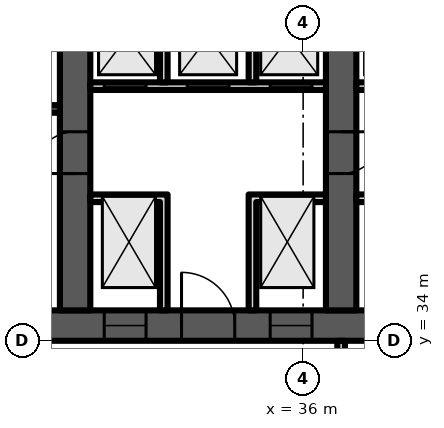
"""IFC4 building model, lengths in metres.
Left out: names, types, materials, properties, quantities, classifications, styles, units other than length and angle.
Written with IfcOpenShell. Run it as: python <this file> out.ifc"""

import sys

from ifc_helpers import new_model, si_unit, direction, frame, frame_2d, origin, place, context, subcontext, project, spatial, polyline, rectangle, outline, extrude, element, fill, save


model = new_model("IFC4")
c1 = context("Model", 3, precision=1e-05, world=origin(), true_north=direction((0.0, 1.0)))
c2 = subcontext(c1, "Body", "Model", "MODEL_VIEW")
j1 = project(units=[si_unit("LENGTHUNIT", "METRE"), si_unit("PLANEANGLEUNIT", "RADIAN")], contexts=[c1])
p1 = place(None, origin())
s1 = spatial("IfcSite", under=j1, at=p1, CompositionType="ELEMENT")
p2 = place(p1, origin())
s2 = spatial("IfcBuilding", under=s1, at=p2, CompositionType="ELEMENT")
p3 = place(p2, frame((0.0, 0.0, 151.9)))
s3 = spatial("IfcBuildingStorey", under=s2, at=p3, CompositionType="ELEMENT", Elevation=151.9)
p4 = place(p3, frame((16.0, 34.4, 0.0), z_axis=(0.0, 0.0, 1.0), x_axis=(1.0, 0.0, 0.0)))
e1 = element("IfcWall", 1, at=p4, inside=s3, PredefinedType="SHEAR", context=c2, shape_type="SweptSolid", body=[
    extrude(rectangle(XDim=42.0, YDim=0.8, at=frame_2d((21.0, 0.0))), origin(), (0.0, 0.0, 1.0), 3.6),
])
p5 = place(p4, frame((3.2, 0.0, 0.0)))
e2 = element("IfcOpeningElement", 2, at=p5, cuts=e1, PredefinedType="OPENING", context=c2, shape_type="SweptSolid", body=[
    extrude(rectangle(XDim=1.0, YDim=2.1, at=frame_2d((0.5, 1.05))), frame((0.0, 0.41, 0.0), z_axis=(0.0, -1.0, 0.0), x_axis=(1.0, 0.0, 0.0)), (0.0, 0.0, 1.0), 0.82),
])
p6 = place(p4, frame((7.65, 0.0, 0.0)))
e3 = element("IfcOpeningElement", 3, at=p6, cuts=e1, PredefinedType="OPENING", context=c2, shape_type="SweptSolid", body=[
    extrude(rectangle(XDim=1.2, YDim=2.1, at=frame_2d((0.6, 1.05))), frame((0.0, 0.41, 0.0), z_axis=(0.0, -1.0, 0.0), x_axis=(1.0, 0.0, 0.0)), (0.0, 0.0, 1.0), 0.82),
])
p7 = place(p4, frame((14.767, 0.0, 0.0)))
e4 = element("IfcOpeningElement", 4, at=p7, cuts=e1, PredefinedType="OPENING", context=c2, shape_type="SweptSolid", body=[
    extrude(rectangle(XDim=1.1, YDim=2.1, at=frame_2d((0.55, 1.05))), frame((0.0, 0.41, 0.0), z_axis=(0.0, -1.0, 0.0), x_axis=(1.0, 0.0, 0.0)), (0.0, 0.0, 1.0), 0.82),
])
p8 = place(p4, frame((19.133, 0.0, 0.0)))
e5 = element("IfcOpeningElement", 5, at=p8, cuts=e1, PredefinedType="OPENING", context=c2, shape_type="SweptSolid", body=[
    extrude(rectangle(XDim=1.1, YDim=2.1, at=frame_2d((0.55, 1.05))), frame((0.0, 0.41, 0.0), z_axis=(0.0, -1.0, 0.0), x_axis=(1.0, 0.0, 0.0)), (0.0, 0.0, 1.0), 0.82),
])
p9 = place(p4, frame((16.8, 0.0, 0.0)))
e6 = element("IfcOpeningElement", 6, at=p9, cuts=e1, PredefinedType="OPENING", context=c2, shape_type="SweptSolid", body=[
    extrude(rectangle(XDim=1.4, YDim=2.1, at=frame_2d((0.7, 1.05))), frame((0.0, 0.41, 0.0), z_axis=(0.0, -1.0, 0.0), x_axis=(1.0, 0.0, 0.0)), (0.0, 0.0, 1.0), 0.82),
])
p10 = place(p4, frame((21.767, 0.0, 0.0)))
e7 = element("IfcOpeningElement", 7, at=p10, cuts=e1, PredefinedType="OPENING", context=c2, shape_type="SweptSolid", body=[
    extrude(rectangle(XDim=1.1, YDim=2.1, at=frame_2d((0.55, 1.05))), frame((0.0, 0.41, 0.0), z_axis=(0.0, -1.0, 0.0), x_axis=(1.0, 0.0, 0.0)), (0.0, 0.0, 1.0), 0.82),
])
p11 = place(p4, frame((23.95, 0.0, 0.0)))
e8 = element("IfcOpeningElement", 8, at=p11, cuts=e1, PredefinedType="OPENING", context=c2, shape_type="SweptSolid", body=[
    extrude(rectangle(XDim=1.1, YDim=2.1, at=frame_2d((0.55, 1.05))), frame((0.0, 0.41, 0.0), z_axis=(0.0, -1.0, 0.0), x_axis=(1.0, 0.0, 0.0)), (0.0, 0.0, 1.0), 0.82),
])
p12 = place(p4, frame((26.133, 0.0, 0.0)))
e9 = element("IfcOpeningElement", 9, at=p12, cuts=e1, PredefinedType="OPENING", context=c2, shape_type="SweptSolid", body=[
    extrude(rectangle(XDim=1.1, YDim=2.1, at=frame_2d((0.55, 1.05))), frame((0.0, 0.41, 0.0), z_axis=(0.0, -1.0, 0.0), x_axis=(1.0, 0.0, 0.0)), (0.0, 0.0, 1.0), 0.82),
])
p13 = place(p4, frame((33.15, 0.0, 0.0)))
e10 = element("IfcOpeningElement", 10, at=p13, cuts=e1, PredefinedType="OPENING", context=c2, shape_type="SweptSolid", body=[
    extrude(rectangle(XDim=1.2, YDim=2.1, at=frame_2d((0.6, 1.05))), frame((0.0, 0.41, 0.0), z_axis=(0.0, -1.0, 0.0), x_axis=(1.0, 0.0, 0.0)), (0.0, 0.0, 1.0), 0.82),
])
p14 = place(p4, frame((35.817, 0.0, 0.0)))
e11 = element("IfcOpeningElement", 11, at=p14, cuts=e1, PredefinedType="OPENING", context=c2, shape_type="SweptSolid", body=[
    extrude(rectangle(XDim=1.0, YDim=2.1, at=frame_2d((0.5, 1.05))), frame((0.0, 0.41, 0.0), z_axis=(0.0, -1.0, 0.0), x_axis=(1.0, 0.0, 0.0)), (0.0, 0.0, 1.0), 0.82),
])
p15 = place(p4, frame((39.95, 0.0, 0.0)))
e12 = element("IfcOpeningElement", 12, at=p15, cuts=e1, PredefinedType="OPENING", context=c2, shape_type="SweptSolid", body=[
    extrude(rectangle(XDim=1.0, YDim=2.1, at=frame_2d((0.5, 1.05))), frame((0.0, 0.41, 0.0), z_axis=(0.0, -1.0, 0.0), x_axis=(1.0, 0.0, 0.0)), (0.0, 0.0, 1.0), 0.82),
])
p16 = place(p4, frame((37.767, 0.0, 0.0)))
e13 = element("IfcOpeningElement", 13, at=p16, cuts=e1, PredefinedType="OPENING", context=c2, shape_type="SweptSolid", body=[
    extrude(rectangle(XDim=1.4, YDim=2.1, at=frame_2d((0.7, 1.05))), frame((0.0, 0.41, 0.0), z_axis=(0.0, -1.0, 0.0), x_axis=(1.0, 0.0, 0.0)), (0.0, 0.0, 1.0), 0.82),
])
p17 = place(p3, frame((30.0, 34.8, 0.0), z_axis=(0.0, 0.0, 1.0), x_axis=(0.0, 1.0, 0.0)))
e14 = element("IfcWall", 14, at=p17, inside=s3, PredefinedType="SHEAR", context=c2, shape_type="SweptSolid", body=[
    extrude(rectangle(XDim=14.374, YDim=0.8, at=frame_2d((7.187, 0.0))), origin(), (0.0, 0.0, 1.0), 3.6),
])
p18 = place(p17, frame((3.6, 0.0, 0.0)))
e15 = element("IfcOpeningElement", 15, at=p18, cuts=e14, PredefinedType="OPENING", context=c2, shape_type="SweptSolid", body=[
    extrude(rectangle(XDim=1.1, YDim=2.1, at=frame_2d((0.55, 1.05))), frame((0.0, 0.41, 0.0), z_axis=(0.0, -1.0, 0.0), x_axis=(1.0, 0.0, 0.0)), (0.0, 0.0, 1.0), 0.82),
])
p19 = place(p3, frame((37.0, 34.8, 0.0), z_axis=(0.0, 0.0, 1.0), x_axis=(0.0, 1.0, 0.0)))
e16 = element("IfcWall", 16, at=p19, inside=s3, PredefinedType="SHEAR", context=c2, shape_type="SweptSolid", body=[
    extrude(rectangle(XDim=14.987, YDim=0.8, at=frame_2d((7.493, 0.0))), origin(), (0.0, 0.0, 1.0), 3.6),
])
p20 = place(p19, frame((11.312, 0.0, 0.0)))
e17 = element("IfcOpeningElement", 17, at=p20, cuts=e16, PredefinedType="OPENING", context=c2, shape_type="SweptSolid", body=[
    extrude(rectangle(XDim=1.0, YDim=2.1, at=frame_2d((0.5, 1.05))), frame((0.0, 0.41, 0.0), z_axis=(0.0, -1.0, 0.0), x_axis=(1.0, 0.0, 0.0)), (0.0, 0.0, 1.0), 0.82),
])
p21 = place(p19, frame((3.6, 0.0, 0.0)))
e18 = element("IfcOpeningElement", 18, at=p21, cuts=e16, PredefinedType="OPENING", context=c2, shape_type="SweptSolid", body=[
    extrude(rectangle(XDim=1.1, YDim=2.1, at=frame_2d((0.55, 1.05))), frame((0.0, 0.41, 0.0), z_axis=(0.0, -1.0, 0.0), x_axis=(1.0, 0.0, 0.0)), (0.0, 0.0, 1.0), 0.82),
])
p22 = place(p3, frame((23.4, 40.1, 0.0), z_axis=(0.0, 0.0, 1.0), x_axis=(1.0, 0.0, 0.0)))
e19 = element("IfcWall", 19, at=p22, inside=s3, PredefinedType="SHEAR", context=c2, shape_type="SweptSolid", body=[
    extrude(rectangle(XDim=6.2, YDim=0.2, at=frame_2d((3.1, 0.0))), origin(), (0.0, 0.0, 1.0), 3.2),
])
p23 = place(p22, frame((3.525, 0.0, 0.0)))
e20 = element("IfcOpeningElement", 20, at=p23, cuts=e19, PredefinedType="OPENING", context=c2, shape_type="SweptSolid", body=[
    extrude(rectangle(XDim=1.2, YDim=2.1, at=frame_2d((0.6, 1.05))), frame((0.0, 0.11, 0.0), z_axis=(0.0, -1.0, 0.0), x_axis=(1.0, 0.0, 0.0)), (0.0, 0.0, 1.0), 0.22),
])
p24 = place(p22, frame((0.575, 0.0, 0.0)))
e21 = element("IfcOpeningElement", 21, at=p24, cuts=e19, PredefinedType="OPENING", context=c2, shape_type="SweptSolid", body=[
    extrude(rectangle(XDim=0.9, YDim=2.1, at=frame_2d((0.45, 1.05))), frame((0.0, 0.11, 0.0), z_axis=(0.0, -1.0, 0.0), x_axis=(1.0, 0.0, 0.0)), (0.0, 0.0, 1.0), 0.22),
])
p25 = place(p3, frame((30.4, 40.7, 0.0), z_axis=(0.0, 0.0, 1.0), x_axis=(1.0, 0.0, 0.0)))
e22 = element("IfcWall", 22, at=p25, inside=s3, PredefinedType="PARTITIONING", context=c2, shape_type="SweptSolid", body=[
    extrude(rectangle(XDim=6.2, YDim=0.2, at=frame_2d((3.1, 0.0))), origin(), (0.0, 0.0, 1.0), 3.2),
])
p26 = place(p25, frame((0.367, 0.0, 0.0)))
e23 = element("IfcOpeningElement", 23, at=p26, cuts=e22, PredefinedType="OPENING", context=c2, shape_type="SweptSolid", body=[
    extrude(rectangle(XDim=1.1, YDim=2.1, at=frame_2d((0.55, 1.05))), frame((0.0, 0.11, 0.0), z_axis=(0.0, -1.0, 0.0), x_axis=(1.0, 0.0, 0.0)), (0.0, 0.0, 1.0), 0.22),
])
p27 = place(p25, frame((2.55, 0.0, 0.0)))
e24 = element("IfcOpeningElement", 24, at=p27, cuts=e22, PredefinedType="OPENING", context=c2, shape_type="SweptSolid", body=[
    extrude(rectangle(XDim=1.1, YDim=2.1, at=frame_2d((0.55, 1.05))), frame((0.0, 0.11, 0.0), z_axis=(0.0, -1.0, 0.0), x_axis=(1.0, 0.0, 0.0)), (0.0, 0.0, 1.0), 0.22),
])
p28 = place(p25, frame((4.733, 0.0, 0.0)))
e25 = element("IfcOpeningElement", 25, at=p28, cuts=e22, PredefinedType="OPENING", context=c2, shape_type="SweptSolid", body=[
    extrude(rectangle(XDim=1.1, YDim=2.1, at=frame_2d((0.55, 1.05))), frame((0.0, 0.11, 0.0), z_axis=(0.0, -1.0, 0.0), x_axis=(1.0, 0.0, 0.0)), (0.0, 0.0, 1.0), 0.22),
])
p29 = place(p3, origin())
e26 = element("IfcWall", 26, at=p29, inside=s3, PredefinedType="PARTITIONING", context=c2, shape_type="SweptSolid", body=[
    extrude(outline(polyline([(32.233, 37.65), (30.4, 37.65), (30.4, 37.85), (32.233, 37.85), (32.433, 37.85), (32.433, 34.8), (32.233, 34.8), (32.233, 37.65)])), origin(), (0.0, 0.0, 1.0), 3.2),
])
p30 = place(p3, origin())
e27 = element("IfcWall", 27, at=p30, inside=s3, PredefinedType="PARTITIONING", context=c2, shape_type="SweptSolid", body=[
    extrude(outline(polyline([(34.567, 37.85), (34.767, 37.85), (36.6, 37.85), (36.6, 37.65), (34.767, 37.65), (34.767, 34.8), (34.567, 34.8), (34.567, 37.85)])), origin(), (0.0, 0.0, 1.0), 3.2),
])
p31 = place(p3, origin())
e28 = element("IfcWall", 28, at=p31, inside=s3, PredefinedType="PARTITIONING", context=c2, shape_type="SweptSolid", body=[
    extrude(outline(polyline([(32.433, 40.8), (32.233, 40.8), (32.233, 43.8), (30.4, 43.8), (30.4, 44.0), (36.6, 44.0), (36.6, 43.8), (34.767, 43.8), (34.767, 40.8), (34.567, 40.8), (34.567, 43.8), (32.433, 43.8), (32.433, 40.8)])), origin(), (0.0, 0.0, 1.0), 3.2),
])
p32 = place(p3, frame((37.4, 40.7, 0.0), z_axis=(0.0, 0.0, 1.0), x_axis=(1.0, 0.0, 0.0)))
e29 = element("IfcWall", 29, at=p32, inside=s3, PredefinedType="PARTITIONING", context=c2, shape_type="SweptSolid", body=[
    extrude(rectangle(XDim=6.2, YDim=0.2, at=frame_2d((3.1, 0.0))), origin(), (0.0, 0.0, 1.0), 3.2),
])
p33 = place(p32, frame((0.367, 0.0, 0.0)))
e30 = element("IfcOpeningElement", 30, at=p33, cuts=e29, PredefinedType="OPENING", context=c2, shape_type="SweptSolid", body=[
    extrude(rectangle(XDim=1.1, YDim=2.1, at=frame_2d((0.55, 1.05))), frame((0.0, 0.11, 0.0), z_axis=(0.0, -1.0, 0.0), x_axis=(1.0, 0.0, 0.0)), (0.0, 0.0, 1.0), 0.22),
])
p34 = place(p32, frame((2.55, 0.0, 0.0)))
e31 = element("IfcOpeningElement", 31, at=p34, cuts=e29, PredefinedType="OPENING", context=c2, shape_type="SweptSolid", body=[
    extrude(rectangle(XDim=1.1, YDim=2.1, at=frame_2d((0.55, 1.05))), frame((0.0, 0.11, 0.0), z_axis=(0.0, -1.0, 0.0), x_axis=(1.0, 0.0, 0.0)), (0.0, 0.0, 1.0), 0.22),
])
p35 = place(p32, frame((4.733, 0.0, 0.0)))
e32 = element("IfcOpeningElement", 32, at=p35, cuts=e29, PredefinedType="OPENING", context=c2, shape_type="SweptSolid", body=[
    extrude(rectangle(XDim=1.1, YDim=2.1, at=frame_2d((0.55, 1.05))), frame((0.0, 0.11, 0.0), z_axis=(0.0, -1.0, 0.0), x_axis=(1.0, 0.0, 0.0)), (0.0, 0.0, 1.0), 0.22),
])
p36 = place(p3, origin())
e33 = element("IfcWall", 33, at=p36, inside=s3, PredefinedType="PARTITIONING", context=c2, shape_type="SweptSolid", body=[
    extrude(outline(polyline([(41.567, 37.1), (39.433, 37.1), (39.433, 34.8), (39.233, 34.8), (39.233, 37.65), (37.4, 37.65), (37.4, 37.85), (39.233, 37.85), (39.433, 37.85), (39.433, 37.3), (41.567, 37.3), (41.567, 37.55), (41.767, 37.55), (43.6, 37.55), (43.6, 37.35), (41.767, 37.35), (41.767, 34.8), (41.567, 34.8), (41.567, 37.1)])), origin(), (0.0, 0.0, 1.0), 3.2),
])
p37 = place(p3, origin())
e34 = element("IfcWall", 34, at=p37, inside=s3, PredefinedType="PARTITIONING", context=c2, shape_type="SweptSolid", body=[
    extrude(outline(polyline([(39.433, 40.8), (39.233, 40.8), (39.233, 43.8), (37.4, 43.8), (37.4, 44.0), (43.6, 44.0), (43.6, 43.8), (41.767, 43.8), (41.767, 40.8), (41.567, 40.8), (41.567, 43.8), (39.433, 43.8), (39.433, 40.8)])), origin(), (0.0, 0.0, 1.0), 3.2),
])
p38 = place(p3, frame((37.0, 30.5, 0.0), z_axis=(0.0, 0.0, 1.0), x_axis=(0.0, 1.0, 0.0)))
e35 = element("IfcWall", 35, at=p38, inside=s3, PredefinedType="PARTITIONING", context=c2, shape_type="SweptSolid", body=[
    extrude(rectangle(XDim=3.5, YDim=0.2, at=frame_2d((1.75, 0.0))), origin(), (0.0, 0.0, 1.0), 3.2),
])
p39 = place(p38, frame((1.2, 0.0, 0.0)))
e36 = element("IfcOpeningElement", 36, at=p39, cuts=e35, PredefinedType="OPENING", context=c2, shape_type="SweptSolid", body=[
    extrude(rectangle(XDim=1.1, YDim=2.1, at=frame_2d((0.55, 1.05))), frame((0.0, 0.11, 0.0), z_axis=(0.0, -1.0, 0.0), x_axis=(1.0, 0.0, 0.0)), (0.0, 0.0, 1.0), 0.22),
])
p40 = place(p7, origin())
e37 = element("IfcDoor", 37, at=p40, inside=s3, OperationType="DOUBLE_DOOR_SLIDING", PredefinedType="DOOR", context=c2, shape_type="SweptSolid", body=[
    extrude(rectangle(XDim=1.1, YDim=2.1, at=frame_2d((0.55, 1.05))), frame((0.0, 0.025, 0.0), z_axis=(0.0, -1.0, 0.0), x_axis=(1.0, 0.0, 0.0)), (0.0, 0.0, 1.0), 0.05),
])
fill(e4, e37)
p41 = place(p8, origin())
e38 = element("IfcDoor", 38, at=p41, inside=s3, OperationType="DOUBLE_DOOR_SLIDING", PredefinedType="DOOR", context=c2, shape_type="SweptSolid", body=[
    extrude(rectangle(XDim=1.1, YDim=2.1, at=frame_2d((0.55, 1.05))), frame((0.0, 0.025, 0.0), z_axis=(0.0, -1.0, 0.0), x_axis=(1.0, 0.0, 0.0)), (0.0, 0.0, 1.0), 0.05),
])
fill(e5, e38)
p42 = place(p9, origin())
e39 = element("IfcDoor", 39, at=p42, inside=s3, OperationType="DOUBLE_DOOR_SINGLE_SWING", PredefinedType="DOOR", context=c2, shape_type="SweptSolid", body=[
    extrude(rectangle(XDim=1.4, YDim=2.1, at=frame_2d((0.7, 1.05))), frame((0.0, 0.025, 0.0), z_axis=(0.0, -1.0, 0.0), x_axis=(1.0, 0.0, 0.0)), (0.0, 0.0, 1.0), 0.05),
])
fill(e6, e39)
p43 = place(p26, origin())
e40 = element("IfcDoor", 40, at=p43, inside=s3, OperationType="DOUBLE_DOOR_SLIDING", PredefinedType="DOOR", context=c2, shape_type="SweptSolid", body=[
    extrude(rectangle(XDim=1.1, YDim=2.1, at=frame_2d((0.55, 1.05))), frame((0.0, 0.025, 0.0), z_axis=(0.0, -1.0, 0.0), x_axis=(1.0, 0.0, 0.0)), (0.0, 0.0, 1.0), 0.05),
])
fill(e23, e40)
p44 = place(p27, origin())
e41 = element("IfcDoor", 41, at=p44, inside=s3, OperationType="DOUBLE_DOOR_SLIDING", PredefinedType="DOOR", context=c2, shape_type="SweptSolid", body=[
    extrude(rectangle(XDim=1.1, YDim=2.1, at=frame_2d((0.55, 1.05))), frame((0.0, 0.025, 0.0), z_axis=(0.0, -1.0, 0.0), x_axis=(1.0, 0.0, 0.0)), (0.0, 0.0, 1.0), 0.05),
])
fill(e24, e41)
p45 = place(p28, origin())
e42 = element("IfcDoor", 42, at=p45, inside=s3, OperationType="DOUBLE_DOOR_SLIDING", PredefinedType="DOOR", context=c2, shape_type="SweptSolid", body=[
    extrude(rectangle(XDim=1.1, YDim=2.1, at=frame_2d((0.55, 1.05))), frame((0.0, 0.025, 0.0), z_axis=(0.0, -1.0, 0.0), x_axis=(1.0, 0.0, 0.0)), (0.0, 0.0, 1.0), 0.05),
])
fill(e25, e42)
p46 = place(p18, origin())
e43 = element("IfcDoor", 43, at=p46, inside=s3, OperationType="SINGLE_SWING_LEFT", PredefinedType="DOOR", context=c2, shape_type="SweptSolid", body=[
    extrude(rectangle(XDim=1.1, YDim=2.1, at=frame_2d((0.55, 1.05))), frame((0.0, 0.025, 0.0), z_axis=(0.0, -1.0, 0.0), x_axis=(1.0, 0.0, 0.0)), (0.0, 0.0, 1.0), 0.05),
])
fill(e15, e43)
p47 = place(p21, origin())
e44 = element("IfcDoor", 44, at=p47, inside=s3, OperationType="SINGLE_SWING_RIGHT", PredefinedType="DOOR", context=c2, shape_type="SweptSolid", body=[
    extrude(rectangle(XDim=1.1, YDim=2.1, at=frame_2d((0.55, 1.05))), frame((0.0, 0.025, 0.0), z_axis=(0.0, -1.0, 0.0), x_axis=(1.0, 0.0, 0.0)), (0.0, 0.0, 1.0), 0.05),
])
fill(e18, e44)
save(model, sys.argv[1])
